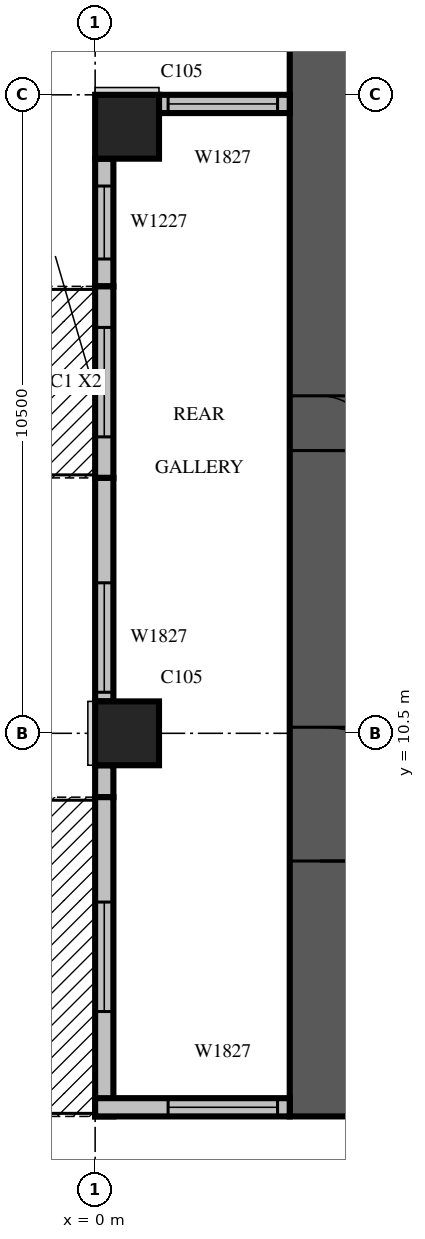
"""IFC4 building model, lengths in metres.
Left out: names, types, materials, properties, quantities, classifications, styles, units other than length and angle.
Written with IfcOpenShell. Run it as: python <this file> out.ifc"""

import sys

from ifc_helpers import new_model, si_unit, direction, frame, frame_2d, origin, origin_2d, place, context, subcontext, project, spatial, rectangle, extrude, source, transform, mapped, element, fill, save


model = new_model("IFC4")
c1 = context("Model", 3, precision=1e-05, world=origin(), true_north=direction((0.0, 1.0)))
c2 = subcontext(c1, "Body", "Model", "MODEL_VIEW")
j1 = project(units=[si_unit("LENGTHUNIT", "METRE"), si_unit("PLANEANGLEUNIT", "RADIAN")], contexts=[c1])
p1 = place(None, origin())
s1 = spatial("IfcSite", under=j1, at=p1, CompositionType="ELEMENT")
p2 = place(p1, origin())
s2 = spatial("IfcBuilding", under=s1, at=p2, CompositionType="ELEMENT")
p3 = place(p2, frame((0.0, 0.0, 120.3)))
s3 = spatial("IfcBuildingStorey", under=s2, at=p3, CompositionType="ELEMENT", Elevation=120.3)
m1 = source(origin(), c2, "Body", "SweptSolid", [
    extrude(rectangle(XDim=1.05, YDim=1.05, at=origin_2d()), origin(), (0.0, 0.0, 1.0), 4.2),
])
for number, where, z_axis, x_axis in (
    (1, (0.525, 10.5, 0.0), (0.0, 0.0, 1.0), (1.0, 0.0, 0.0)),
    (2, (0.525, 20.475, 0.0), (0.0, 0.0, 1.0), (1.0, 0.0, 0.0)),
):
    element("IfcColumn", number, at=place(p3, frame(where, z_axis=z_axis, x_axis=x_axis)), inside=s3, PredefinedType="COLUMN", context=c2, shape_type="MappedRepresentation", body=[
        mapped(m1, transform((0.0, 0.0, 0.0), scale=1.0)),
    ])
m2 = source(origin(), c2, "Body", "SweptSolid", [
    extrude(rectangle(XDim=17.8, YDim=1.0, at=frame_2d((8.9, 0.0))), origin(), (0.0, 0.0, 1.0), 4.2),
])
p4 = place(p3, frame((3.7, 4.2, 0.0), z_axis=(0.0, 0.0, 1.0), x_axis=(0.0, 1.0, 0.0)))
e3 = element("IfcWall", 3, at=p4, inside=s3, PredefinedType="SHEAR", context=c2, shape_type="MappedRepresentation", body=[
    mapped(m2, transform((0.0, 0.0, 0.0), scale=1.0)),
])
m3 = source(origin(), c2, "Body", "SweptSolid", [
    extrude(rectangle(XDim=2.2, YDim=2.1, at=frame_2d((1.1, 1.05))), frame((0.0, 0.51, 0.0), z_axis=(0.0, -1.0, 0.0), x_axis=(1.0, 0.0, 0.0)), (0.0, 0.0, 1.0), 1.02),
])
p5 = place(p4, frame((4.2, 0.0, 0.0)))
e4 = element("IfcOpeningElement", 4, at=p5, cuts=e3, PredefinedType="OPENING", context=c2, shape_type="MappedRepresentation", body=[
    mapped(m3, transform((0.0, 0.0, 0.0), scale=1.0)),
])
m4 = source(origin(), c2, "Body", "SweptSolid", [
    extrude(rectangle(XDim=0.9, YDim=2.1, at=frame_2d((0.45, 1.05))), frame((0.0, 0.51, 0.0), z_axis=(0.0, -1.0, 0.0), x_axis=(1.0, 0.0, 0.0)), (0.0, 0.0, 1.0), 1.02),
])
p6 = place(p4, frame((10.95, 0.0, 0.0)))
e5 = element("IfcOpeningElement", 5, at=p6, cuts=e3, PredefinedType="OPENING", context=c2, shape_type="MappedRepresentation", body=[
    mapped(m4, transform((0.0, 0.0, 0.0), scale=1.0)),
])
m5 = source(origin(), c2, "Body", "SweptSolid", [
    extrude(rectangle(XDim=2.15, YDim=0.3, at=frame_2d((1.075, 0.0))), origin(), (0.0, 0.0, 1.0), 3.8),
])
p7 = place(p3, frame((3.2, 20.85, 0.0), z_axis=(0.0, 0.0, 1.0), x_axis=(-1.0, 0.0, 0.0)))
e6 = element("IfcWall", 6, at=p7, inside=s3, PredefinedType="STANDARD", context=c2, shape_type="MappedRepresentation", body=[
    mapped(m5, transform((0.0, 0.0, 0.0), scale=1.0)),
])
m6 = source(origin(), c2, "Body", "SweptSolid", [
    extrude(rectangle(XDim=1.8, YDim=2.7, at=frame_2d((0.9, 1.35))), frame((0.0, 0.16, 0.0), z_axis=(0.0, -1.0, 0.0), x_axis=(1.0, 0.0, 0.0)), (0.0, 0.0, 1.0), 0.32),
])
p8 = place(p7, frame((0.2, 0.0, 0.6)))
e7 = element("IfcOpeningElement", 7, at=p8, cuts=e6, PredefinedType="OPENING", context=c2, shape_type="MappedRepresentation", body=[
    mapped(m6, transform((0.0, 0.0, 0.0), scale=1.0)),
])
m7 = source(origin(), c2, "Body", "SweptSolid", [
    extrude(rectangle(XDim=2.1, YDim=0.3, at=frame_2d((1.05, 0.0))), origin(), (0.0, 0.0, 1.0), 3.8),
])
p9 = place(p3, frame((0.15, 19.95, 0.0), z_axis=(0.0, 0.0, 1.0), x_axis=(0.0, -1.0, 0.0)))
e8 = element("IfcWall", 8, at=p9, inside=s3, PredefinedType="STANDARD", context=c2, shape_type="MappedRepresentation", body=[
    mapped(m7, transform((0.0, 0.0, 0.0), scale=1.0)),
])
m8 = source(origin(), c2, "Body", "SweptSolid", [
    extrude(rectangle(XDim=1.2, YDim=2.7, at=frame_2d((0.6, 1.35))), frame((0.0, 0.16, 0.0), z_axis=(0.0, -1.0, 0.0), x_axis=(1.0, 0.0, 0.0)), (0.0, 0.0, 1.0), 0.32),
])
p10 = place(p9, frame((0.45, 0.0, 0.6)))
e9 = element("IfcOpeningElement", 9, at=p10, cuts=e8, PredefinedType="OPENING", context=c2, shape_type="MappedRepresentation", body=[
    mapped(m8, transform((0.0, 0.0, 0.0), scale=1.0)),
])
m9 = source(origin(), c2, "Body", "SweptSolid", [
    extrude(rectangle(XDim=3.15, YDim=0.3, at=frame_2d((1.575, 0.0))), origin(), (0.0, 0.0, 1.0), 3.8),
])
p11 = place(p3, frame((0.15, 17.85, 0.0), z_axis=(0.0, 0.0, 1.0), x_axis=(0.0, -1.0, 0.0)))
e10 = element("IfcWall", 10, at=p11, inside=s3, PredefinedType="STANDARD", context=c2, shape_type="MappedRepresentation", body=[
    mapped(m9, transform((0.0, 0.0, 0.0), scale=1.0)),
])
m10 = source(origin(), c2, "Body", "SweptSolid", [
    extrude(rectangle(XDim=1.8, YDim=2.4, at=frame_2d((0.9, 1.2))), frame((0.0, 0.16, 0.0), z_axis=(0.0, -1.0, 0.0), x_axis=(1.0, 0.0, 0.0)), (0.0, 0.0, 1.0), 0.32),
])
p12 = place(p11, frame((0.675, 0.0, 0.0)))
e11 = element("IfcOpeningElement", 11, at=p12, cuts=e10, PredefinedType="OPENING", context=c2, shape_type="MappedRepresentation", body=[
    mapped(m10, transform((0.0, 0.0, 0.0), scale=1.0)),
])
m11 = source(origin(), c2, "Body", "SweptSolid", [
    extrude(rectangle(XDim=3.675, YDim=0.3, at=frame_2d((1.837, 0.0))), origin(), (0.0, 0.0, 1.0), 3.8),
])
p13 = place(p3, frame((0.15, 14.7, 0.0), z_axis=(0.0, 0.0, 1.0), x_axis=(0.0, -1.0, 0.0)))
e12 = element("IfcWall", 12, at=p13, inside=s3, PredefinedType="STANDARD", context=c2, shape_type="MappedRepresentation", body=[
    mapped(m11, transform((0.0, 0.0, 0.0), scale=1.0)),
])
p14 = place(p13, frame((1.725, 0.0, 0.6)))
e13 = element("IfcOpeningElement", 13, at=p14, cuts=e12, PredefinedType="OPENING", context=c2, shape_type="MappedRepresentation", body=[
    mapped(m6, transform((0.0, 0.0, 0.0), scale=1.0)),
])
m12 = source(origin(), c2, "Body", "SweptSolid", [
    extrude(rectangle(XDim=0.525, YDim=0.3, at=frame_2d((0.263, 0.0))), origin(), (0.0, 0.0, 1.0), 3.8),
])
p15 = place(p3, frame((0.15, 9.975, 0.0), z_axis=(0.0, 0.0, 1.0), x_axis=(0.0, -1.0, 0.0)))
e14 = element("IfcWall", 14, at=p15, inside=s3, PredefinedType="STANDARD", context=c2, shape_type="MappedRepresentation", body=[
    mapped(m12, transform((0.0, 0.0, 0.0), scale=1.0)),
])
m13 = source(origin(), c2, "Body", "SweptSolid", [
    extrude(rectangle(XDim=5.25, YDim=0.3, at=frame_2d((2.625, 0.0))), origin(), (0.0, 0.0, 1.0), 3.8),
])
p16 = place(p3, frame((0.15, 9.45, 0.0), z_axis=(0.0, 0.0, 1.0), x_axis=(0.0, -1.0, 0.0)))
e15 = element("IfcWall", 15, at=p16, inside=s3, PredefinedType="STANDARD", context=c2, shape_type="MappedRepresentation", body=[
    mapped(m13, transform((0.0, 0.0, 0.0), scale=1.0)),
])
p17 = place(p16, frame((1.725, 0.0, 0.0)))
e16 = element("IfcOpeningElement", 16, at=p17, cuts=e15, PredefinedType="OPENING", context=c2, shape_type="MappedRepresentation", body=[
    mapped(m10, transform((0.0, 0.0, 0.0), scale=1.0)),
])
m14 = source(origin(), c2, "Body", "SweptSolid", [
    extrude(rectangle(XDim=3.2, YDim=0.3, at=frame_2d((1.6, 0.0))), origin(), (0.0, 0.0, 1.0), 3.8),
])
p18 = place(p3, frame((0.0, 4.35, 0.0), z_axis=(0.0, 0.0, 1.0), x_axis=(1.0, 0.0, 0.0)))
e17 = element("IfcWall", 17, at=p18, inside=s3, PredefinedType="STANDARD", context=c2, shape_type="MappedRepresentation", body=[
    mapped(m14, transform((0.0, 0.0, 0.0), scale=1.0)),
])
p19 = place(p18, frame((1.2, 0.0, 0.6)))
e18 = element("IfcOpeningElement", 18, at=p19, cuts=e17, PredefinedType="OPENING", context=c2, shape_type="MappedRepresentation", body=[
    mapped(m6, transform((0.0, 0.0, 0.0), scale=1.0)),
])
m15 = source(origin(), c2, "Body", "SweptSolid", [
    extrude(rectangle(XDim=1.8, YDim=2.7, at=frame_2d((0.9, 1.35))), frame((0.0, 0.03, 0.0), z_axis=(0.0, -1.0, 0.0), x_axis=(1.0, 0.0, 0.0)), (0.0, 0.0, 1.0), 0.06),
])
p20 = place(p8, origin())
e19 = element("IfcWindow", 19, at=p20, inside=s3, PartitioningType="SINGLE_PANEL", PredefinedType="WINDOW", context=c2, shape_type="MappedRepresentation", body=[
    mapped(m15, transform((0.0, 0.0, 0.0), scale=1.0)),
])
fill(e7, e19)
m16 = source(origin(), c2, "Body", "SweptSolid", [
    extrude(rectangle(XDim=1.2, YDim=2.7, at=frame_2d((0.6, 1.35))), frame((0.0, 0.03, 0.0), z_axis=(0.0, -1.0, 0.0), x_axis=(1.0, 0.0, 0.0)), (0.0, 0.0, 1.0), 0.06),
])
p21 = place(p10, origin())
e20 = element("IfcWindow", 20, at=p21, inside=s3, PartitioningType="SINGLE_PANEL", PredefinedType="WINDOW", context=c2, shape_type="MappedRepresentation", body=[
    mapped(m16, transform((0.0, 0.0, 0.0), scale=1.0)),
])
fill(e9, e20)
m17 = source(origin(), c2, "Body", "SweptSolid", [
    extrude(rectangle(XDim=1.8, YDim=2.4, at=frame_2d((0.9, 1.2))), frame((0.0, 0.025, 0.0), z_axis=(0.0, -1.0, 0.0), x_axis=(1.0, 0.0, 0.0)), (0.0, 0.0, 1.0), 0.05),
])
p22 = place(p12, origin())
e21 = element("IfcDoor", 21, at=p22, inside=s3, OperationType="SLIDING_TO_LEFT", PredefinedType="DOOR", context=c2, shape_type="MappedRepresentation", body=[
    mapped(m17, transform((0.0, 0.0, 0.0), scale=1.0)),
])
fill(e11, e21)
p23 = place(p14, origin())
e22 = element("IfcWindow", 22, at=p23, inside=s3, PartitioningType="SINGLE_PANEL", PredefinedType="WINDOW", context=c2, shape_type="MappedRepresentation", body=[
    mapped(m15, transform((0.0, 0.0, 0.0), scale=1.0)),
])
fill(e13, e22)
p24 = place(p17, origin())
e23 = element("IfcDoor", 23, at=p24, inside=s3, OperationType="SLIDING_TO_LEFT", PredefinedType="DOOR", context=c2, shape_type="MappedRepresentation", body=[
    mapped(m17, transform((0.0, 0.0, 0.0), scale=1.0)),
])
fill(e16, e23)
p25 = place(p19, origin())
e24 = element("IfcWindow", 24, at=p25, inside=s3, PartitioningType="SINGLE_PANEL", PredefinedType="WINDOW", context=c2, shape_type="MappedRepresentation", body=[
    mapped(m15, transform((0.0, 0.0, 0.0), scale=1.0)),
])
fill(e18, e24)
m18 = source(origin(), c2, "Body", "SweptSolid", [
    extrude(rectangle(XDim=2.2, YDim=2.1, at=frame_2d((1.1, 1.05))), frame((0.0, 0.025, 0.0), z_axis=(0.0, -1.0, 0.0), x_axis=(1.0, 0.0, 0.0)), (0.0, 0.0, 1.0), 0.05),
])
p26 = place(p5, origin())
e25 = element("IfcDoor", 25, at=p26, inside=s3, OperationType="DOUBLE_DOOR_SINGLE_SWING", PredefinedType="DOOR", context=c2, shape_type="MappedRepresentation", body=[
    mapped(m18, transform((0.0, 0.0, 0.0), scale=1.0)),
])
fill(e4, e25)
m19 = source(origin(), c2, "Body", "SweptSolid", [
    extrude(rectangle(XDim=0.9, YDim=2.1, at=frame_2d((0.45, 1.05))), frame((0.0, 0.025, 0.0), z_axis=(0.0, -1.0, 0.0), x_axis=(1.0, 0.0, 0.0)), (0.0, 0.0, 1.0), 0.05),
])
p27 = place(p6, origin())
e26 = element("IfcDoor", 26, at=p27, inside=s3, OperationType="SINGLE_SWING_RIGHT", PredefinedType="DOOR", context=c2, shape_type="MappedRepresentation", body=[
    mapped(m19, transform((0.0, 0.0, 0.0), scale=1.0)),
])
fill(e5, e26)
save(model, sys.argv[1])
